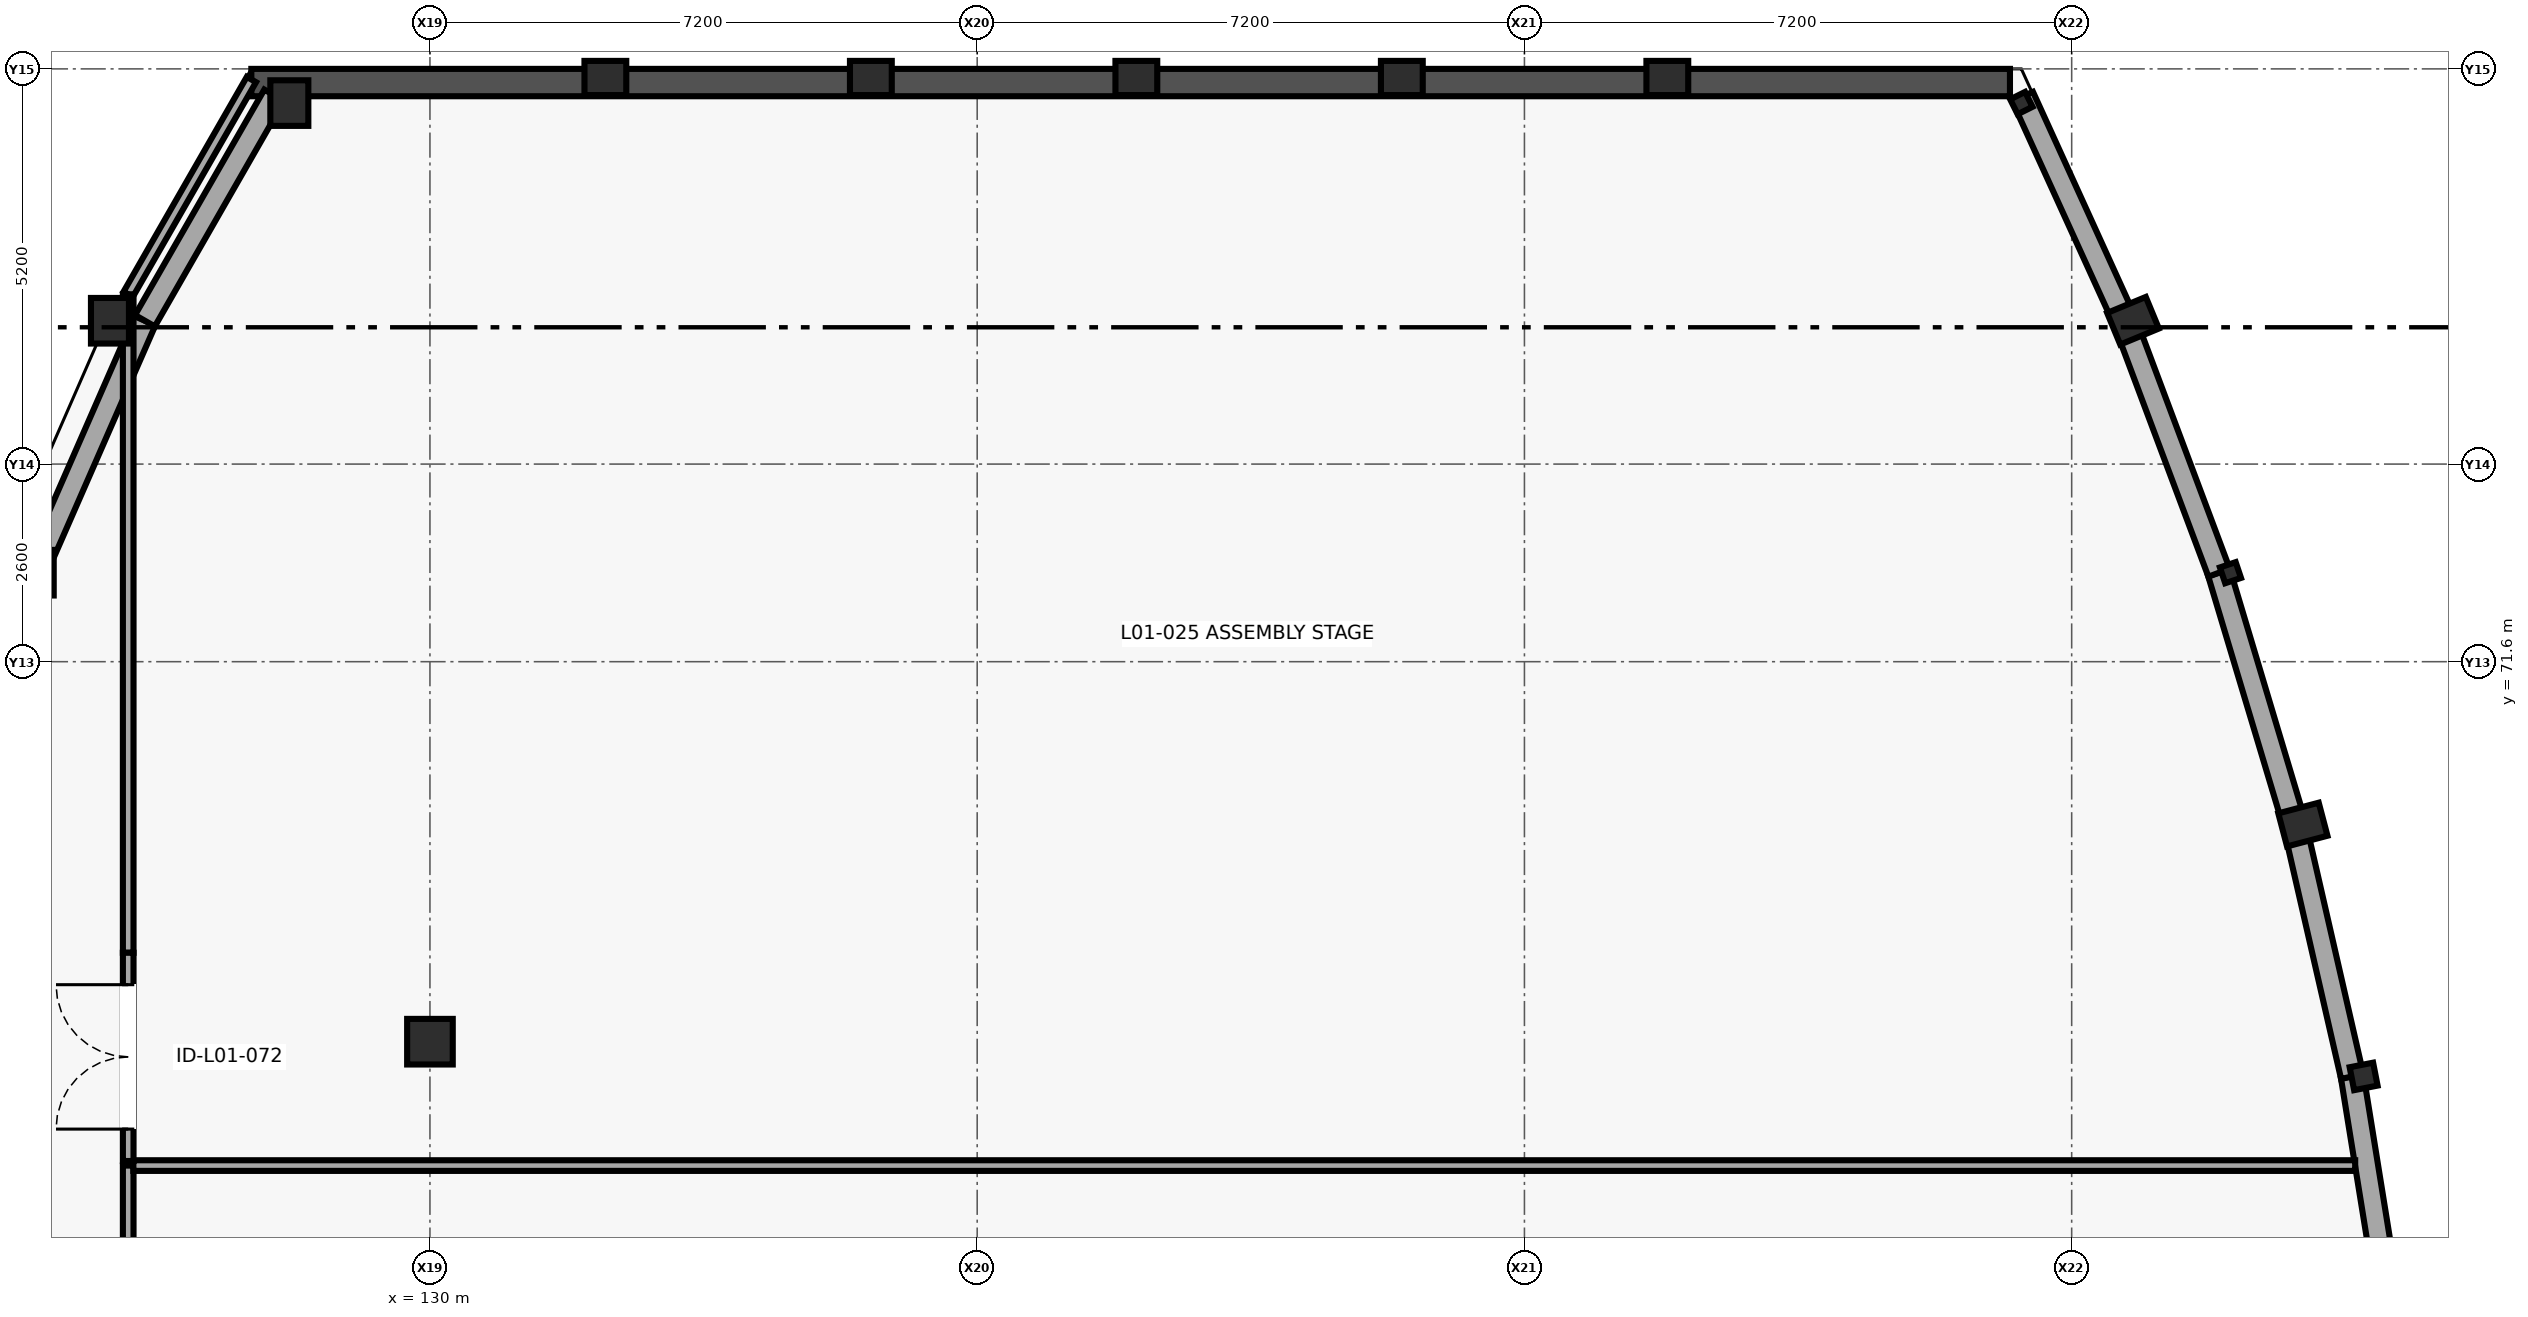
"""IFC4 building model, lengths in metres.
Left out: names, types, materials, properties, quantities, classifications, styles, units other than length and angle.
Written with IfcOpenShell. Run it as: python <this file> out.ifc"""

import sys

from ifc_helpers import new_model, si_unit, direction, frame, frame_2d, origin, origin_2d, place, context, subcontext, project, spatial, rectangle, hollow_circle, i_section, extrude, element, fill, save


model = new_model("IFC4")
c1 = context("Model", 3, precision=1e-05, world=origin(), true_north=direction((0.0, 1.0)))
c2 = subcontext(c1, "Body", "Model", "MODEL_VIEW")
j1 = project(units=[si_unit("LENGTHUNIT", "METRE"), si_unit("PLANEANGLEUNIT", "RADIAN")], contexts=[c1])
p1 = place(None, origin())
s1 = spatial("IfcSite", under=j1, at=p1, CompositionType="ELEMENT")
p2 = place(p1, origin())
s2 = spatial("IfcBuilding", under=s1, at=p2, CompositionType="ELEMENT")
p3 = place(p2, frame((0.0, 0.0, 4.2)))
s3 = spatial("IfcBuildingStorey", under=s2, at=p3, CompositionType="ELEMENT", Elevation=4.2)
for number, where, z_axis, x_axis in (
    (1, (124.8, 72.771, 0.0), (0.0, 0.0, 1.0), (1.0, 0.0, 0.0)),
    (2, (125.79, 76.086, 0.0), (0.0, 0.0, 1.0), (1.0, 0.0, 0.0)),
    (3, (128.15, 78.95, 0.0), (0.0, 0.0, 1.0), (1.0, 0.0, 0.0)),
):
    element("IfcColumn", number, at=place(p3, frame(where, z_axis=z_axis, x_axis=x_axis)), inside=s3, PredefinedType="PILASTER", context=c2, shape_type="SweptSolid", body=[
        extrude(rectangle(XDim=0.5, YDim=0.6, at=origin_2d()), origin(), (0.0, 0.0, 1.0), 4.0),
    ])
p4 = place(p3, frame((130.0, 66.6, 0.0), z_axis=(0.0, 0.0, 1.0), x_axis=(1.0, 0.0, 0.0)))
e4 = element("IfcColumn", 4, at=p4, inside=s3, PredefinedType="COLUMN", context=c2, shape_type="SweptSolid", body=[
    extrude(rectangle(XDim=0.6, YDim=0.6, at=origin_2d()), origin(), (0.0, 0.0, 1.0), 4.0),
])
for number, where, z_axis, x_axis in (
    (5, (132.308, 79.28, 0.0), (0.0, 0.0, 1.0), (0.0, 1.0, 0.0)),
    (6, (135.801, 79.28, 0.0), (0.0, 0.0, 1.0), (0.0, 1.0, 0.0)),
    (7, (139.294, 79.28, 0.0), (0.0, 0.0, 1.0), (0.0, 1.0, 0.0)),
    (8, (142.787, 79.28, 0.0), (0.0, 0.0, 1.0), (0.0, 1.0, 0.0)),
    (9, (146.28, 79.28, 0.0), (0.0, 0.0, 1.0), (0.0, 1.0, 0.0)),
):
    element("IfcColumn", number, at=place(p3, frame(where, z_axis=z_axis, x_axis=x_axis)), inside=s3, PredefinedType="PILASTER", context=c2, shape_type="SweptSolid", body=[
        extrude(rectangle(XDim=0.45, YDim=0.55, at=origin_2d()), origin(), (0.0, 0.0, 1.0), 4.0),
    ])
p5 = place(p3, frame((150.938, 78.95, 0.0), z_axis=(0.0, 0.0, 1.0), x_axis=(-0.44619781311, 0.894934361602, 0.0)))
e10 = element("IfcColumn", 10, at=p5, inside=s3, PredefinedType="PILASTER", context=c2, shape_type="SweptSolid", body=[
    extrude(hollow_circle(Radius=0.11, WallThickness=0.01, at=origin_2d()), origin(), (0.0, 0.0, 1.0), 4.0),
])
p6 = place(p3, frame((152.407, 76.086, 0.0), z_axis=(0.0, 0.0, 1.0), x_axis=(-0.382360914263, 0.92401305794, 0.0)))
e11 = element("IfcColumn", 11, at=p6, inside=s3, PredefinedType="PILASTER", context=c2, shape_type="SweptSolid", body=[
    extrude(rectangle(XDim=0.45, YDim=0.55, at=origin_2d()), origin(), (0.0, 0.0, 1.0), 4.0),
])
p7 = place(p3, frame((153.689, 72.771, 0.0), z_axis=(0.0, 0.0, 1.0), x_axis=(-0.318628456287, 0.947879690069, 0.0)))
e12 = element("IfcColumn", 12, at=p7, inside=s3, PredefinedType="PILASTER", context=c2, shape_type="SweptSolid", body=[
    extrude(hollow_circle(Radius=0.11, WallThickness=0.01, at=origin_2d()), origin(), (0.0, 0.0, 1.0), 4.0),
])
p8 = place(p3, frame((154.642, 69.457, 0.0), z_axis=(0.0, 0.0, 1.0), x_axis=(-0.2549394954, 0.966957007154, 0.0)))
e13 = element("IfcColumn", 13, at=p8, inside=s3, PredefinedType="PILASTER", context=c2, shape_type="SweptSolid", body=[
    extrude(rectangle(XDim=0.45, YDim=0.55, at=origin_2d()), origin(), (0.0, 0.0, 1.0), 4.0),
])
p9 = place(p3, frame((155.441, 66.143, 0.0), z_axis=(0.0, 0.0, 1.0), x_axis=(-0.191151636272, 0.981560518741, 0.0)))
e14 = element("IfcColumn", 14, at=p9, inside=s3, PredefinedType="COLUMN", context=c2, shape_type="SweptSolid", body=[
    extrude(i_section(OverallWidth=0.307, OverallDepth=0.314, WebThickness=0.012, FlangeThickness=0.019, FilletRadius=0.015, at=origin_2d()), origin(), (0.0, 0.0, 1.0), 4.0),
])
p10 = place(p3, frame((155.826, 62.829, 0.0), z_axis=(0.0, 0.0, 1.0), x_axis=(-0.159349054769, 0.987222304623, 0.0)))
e15 = element("IfcWall", 15, at=p10, inside=s3, PredefinedType="SOLIDWALL", context=c2, shape_type="SweptSolid", body=[
    extrude(rectangle(XDim=3.357, YDim=0.3, at=frame_2d((1.678, 0.0))), origin(), (0.0, 0.0, 1.0), 3.745),
])
p11 = place(p3, frame((155.291, 66.143, 0.0), z_axis=(0.0, 0.0, 1.0), x_axis=(-0.223259599234, 0.974759022195, 0.0)))
e16 = element("IfcWall", 16, at=p11, inside=s3, PredefinedType="SOLIDWALL", context=c2, shape_type="SweptSolid", body=[
    extrude(rectangle(XDim=3.4, YDim=0.3, at=frame_2d((1.7, 0.0))), origin(), (0.0, 0.0, 1.0), 3.745),
])
p12 = place(p3, frame((154.532, 69.457, 0.0), z_axis=(0.0, 0.0, 1.0), x_axis=(-0.287011200065, 0.957927226379, 0.0)))
e17 = element("IfcWall", 17, at=p12, inside=s3, PredefinedType="SOLIDWALL", context=c2, shape_type="SweptSolid", body=[
    extrude(rectangle(XDim=3.459, YDim=0.3, at=frame_2d((1.73, 0.0))), origin(), (0.0, 0.0, 1.0), 3.745),
])
p13 = place(p3, frame((153.539, 72.771, 0.0), z_axis=(0.0, 0.0, 1.0), x_axis=(-0.350836219137, 0.936436835746, 0.0)))
e18 = element("IfcWall", 18, at=p13, inside=s3, PredefinedType="SOLIDWALL", context=c2, shape_type="SweptSolid", body=[
    extrude(rectangle(XDim=3.54, YDim=0.3, at=frame_2d((1.77, 0.0))), origin(), (0.0, 0.0, 1.0), 3.745),
])
p14 = place(p3, frame((152.297, 76.086, 0.0), z_axis=(0.0, 0.0, 1.0), x_axis=(-0.414347666712, 0.910118679673, 0.0)))
e19 = element("IfcWall", 19, at=p14, inside=s3, PredefinedType="SOLIDWALL", context=c2, shape_type="SweptSolid", body=[
    extrude(rectangle(XDim=3.241, YDim=0.3, at=frame_2d((1.621, 0.0))), origin(), (0.0, 0.0, 1.0), 3.745),
])
p15 = place(p3, frame((150.788, 79.22, 0.0), z_axis=(0.0, 0.0, 1.0), x_axis=(-1.0, 0.0, 0.0)))
e20 = element("IfcWall", 20, at=p15, inside=s3, PredefinedType="SHEAR", context=c2, shape_type="SweptSolid", body=[
    extrude(rectangle(XDim=23.138, YDim=0.36, at=frame_2d((11.569, 0.0))), origin(), (0.0, 0.0, 1.0), 4.0),
])
p16 = place(p3, frame((126.25, 76.086, 0.0), z_axis=(0.0, 0.0, 1.0), x_axis=(-0.400740958437, -0.916191401526, 0.0)))
e21 = element("IfcWall", 21, at=p16, inside=s3, PredefinedType="SOLIDWALL", context=c2, shape_type="SweptSolid", body=[
    extrude(rectangle(XDim=3.618, YDim=0.3, at=frame_2d((1.809, 0.0))), origin(), (0.0, 0.0, 1.0), 3.745),
])
p17 = place(p3, frame((127.951, 79.053, 0.0), z_axis=(0.0, 0.0, 1.0), x_axis=(-0.497345429475, -0.867552605771, 0.0)))
e22 = element("IfcWall", 22, at=p17, inside=s3, PredefinedType="SOLIDWALL", context=c2, shape_type="SweptSolid", body=[
    extrude(rectangle(XDim=3.42, YDim=0.3, at=frame_2d((1.71, 0.0))), origin(), (0.0, 0.0, 1.0), 3.78),
])
p18 = place(p3, frame((126.03, 64.97, 0.0), z_axis=(0.0, 0.0, 1.0), x_axis=(0.0, -1.0, 0.0)))
e23 = element("IfcWall", 23, at=p18, inside=s3, PredefinedType="PARTITIONING", context=c2, shape_type="SweptSolid", body=[
    extrude(rectangle(XDim=20.34, YDim=0.14, at=frame_2d((10.17, 0.0))), origin(), (0.0, 0.0, 1.0), 3.78),
])
p19 = place(p18, frame((9.22, 0.0, 0.0)))
e24 = element("IfcOpeningElement", 24, at=p19, cuts=e23, PredefinedType="OPENING", context=c2, shape_type="SweptSolid", body=[
    extrude(rectangle(XDim=1.9, YDim=2.5, at=frame_2d((0.95, 1.25))), frame((0.0, 0.08, 0.0), z_axis=(0.0, -1.0, 0.0), x_axis=(1.0, 0.0, 0.0)), (0.0, 0.0, 1.0), 0.16),
])
p20 = place(p18, frame((6.454, 0.0, 0.0)))
e25 = element("IfcOpeningElement", 25, at=p20, cuts=e23, PredefinedType="OPENING", context=c2, shape_type="SweptSolid", body=[
    extrude(rectangle(XDim=1.9, YDim=2.5, at=frame_2d((0.95, 1.25))), frame((0.0, 0.08, 0.0), z_axis=(0.0, -1.0, 0.0), x_axis=(1.0, 0.0, 0.0)), (0.0, 0.0, 1.0), 0.16),
])
p21 = place(p18, frame((11.82, 0.0, 1.05)))
e26 = element("IfcOpeningElement", 26, at=p21, cuts=e23, PredefinedType="OPENING", context=c2, shape_type="SweptSolid", body=[
    extrude(rectangle(XDim=1.6, YDim=1.1, at=frame_2d((0.8, 0.55))), frame((0.0, 0.08, 0.0), z_axis=(0.0, -1.0, 0.0), x_axis=(1.0, 0.0, 0.0)), (0.0, 0.0, 1.0), 0.16),
])
p22 = place(p3, frame((155.33, 64.97, 0.0), z_axis=(0.0, 0.0, 1.0), x_axis=(-1.0, 0.0, 0.0)))
e27 = element("IfcWall", 27, at=p22, inside=s3, PredefinedType="PARTITIONING", context=c2, shape_type="SweptSolid", body=[
    extrude(rectangle(XDim=29.232, YDim=0.14, at=frame_2d((14.616, 0.0))), origin(), (0.0, 0.0, 1.0), 3.78),
])
p23 = place(p3, frame((127.651, 79.26, 0.0), z_axis=(0.0, 0.0, 1.0), x_axis=(-0.497534508733, -0.867444184152, 0.0)))
e28 = element("IfcWall", 28, at=p23, inside=s3, PredefinedType="PARTITIONING", context=c2, shape_type="SweptSolid", body=[
    extrude(rectangle(XDim=3.258, YDim=0.14, at=frame_2d((1.629, 0.0))), origin(), (0.0, 0.0, 1.0), 3.78),
])
p24 = place(p3, frame((126.03, 76.434, 0.0), z_axis=(0.0, 0.0, 1.0), x_axis=(0.0, -1.0, 0.0)))
e29 = element("IfcWall", 29, at=p24, inside=s3, PredefinedType="PARTITIONING", context=c2, shape_type="SweptSolid", body=[
    extrude(rectangle(XDim=8.664, YDim=0.14, at=frame_2d((4.332, 0.0))), origin(), (0.0, 0.0, 1.0), 3.78),
])
p25 = place(p3, frame((126.03, 67.77, 0.0), z_axis=(0.0, 0.0, 1.0), x_axis=(0.0, -1.0, 0.0)))
e30 = element("IfcWall", 30, at=p25, inside=s3, PredefinedType="PARTITIONING", context=c2, shape_type="SweptSolid", body=[
    extrude(rectangle(XDim=2.74, YDim=0.14, at=frame_2d((1.37, 0.0))), origin(), (0.0, 0.0, 1.0), 3.78),
])
p26 = place(p25, frame((0.42, 0.0, 0.0)))
e31 = element("IfcOpeningElement", 31, at=p26, cuts=e30, PredefinedType="OPENING", context=c2, shape_type="SweptSolid", body=[
    extrude(rectangle(XDim=1.9, YDim=2.5, at=frame_2d((0.95, 1.25))), frame((0.0, 0.08, 0.0), z_axis=(0.0, -1.0, 0.0), x_axis=(1.0, 0.0, 0.0)), (0.0, 0.0, 1.0), 0.16),
])
p27 = place(p26, frame((1.9, 0.0, 0.0), z_axis=(0.0, 0.0, 1.0), x_axis=(-1.0, 0.0, 0.0)))
e32 = element("IfcDoor", 32, at=p27, inside=s3, OperationType="DOUBLE_DOOR_SINGLE_SWING", PredefinedType="DOOR", context=c2, shape_type="SweptSolid", body=[
    extrude(rectangle(XDim=1.9, YDim=2.5, at=frame_2d((0.95, 1.25))), frame((0.0, 0.025, 0.0), z_axis=(0.0, -1.0, 0.0), x_axis=(1.0, 0.0, 0.0)), (0.0, 0.0, 1.0), 0.05),
])
fill(e31, e32)
save(model, sys.argv[1])
